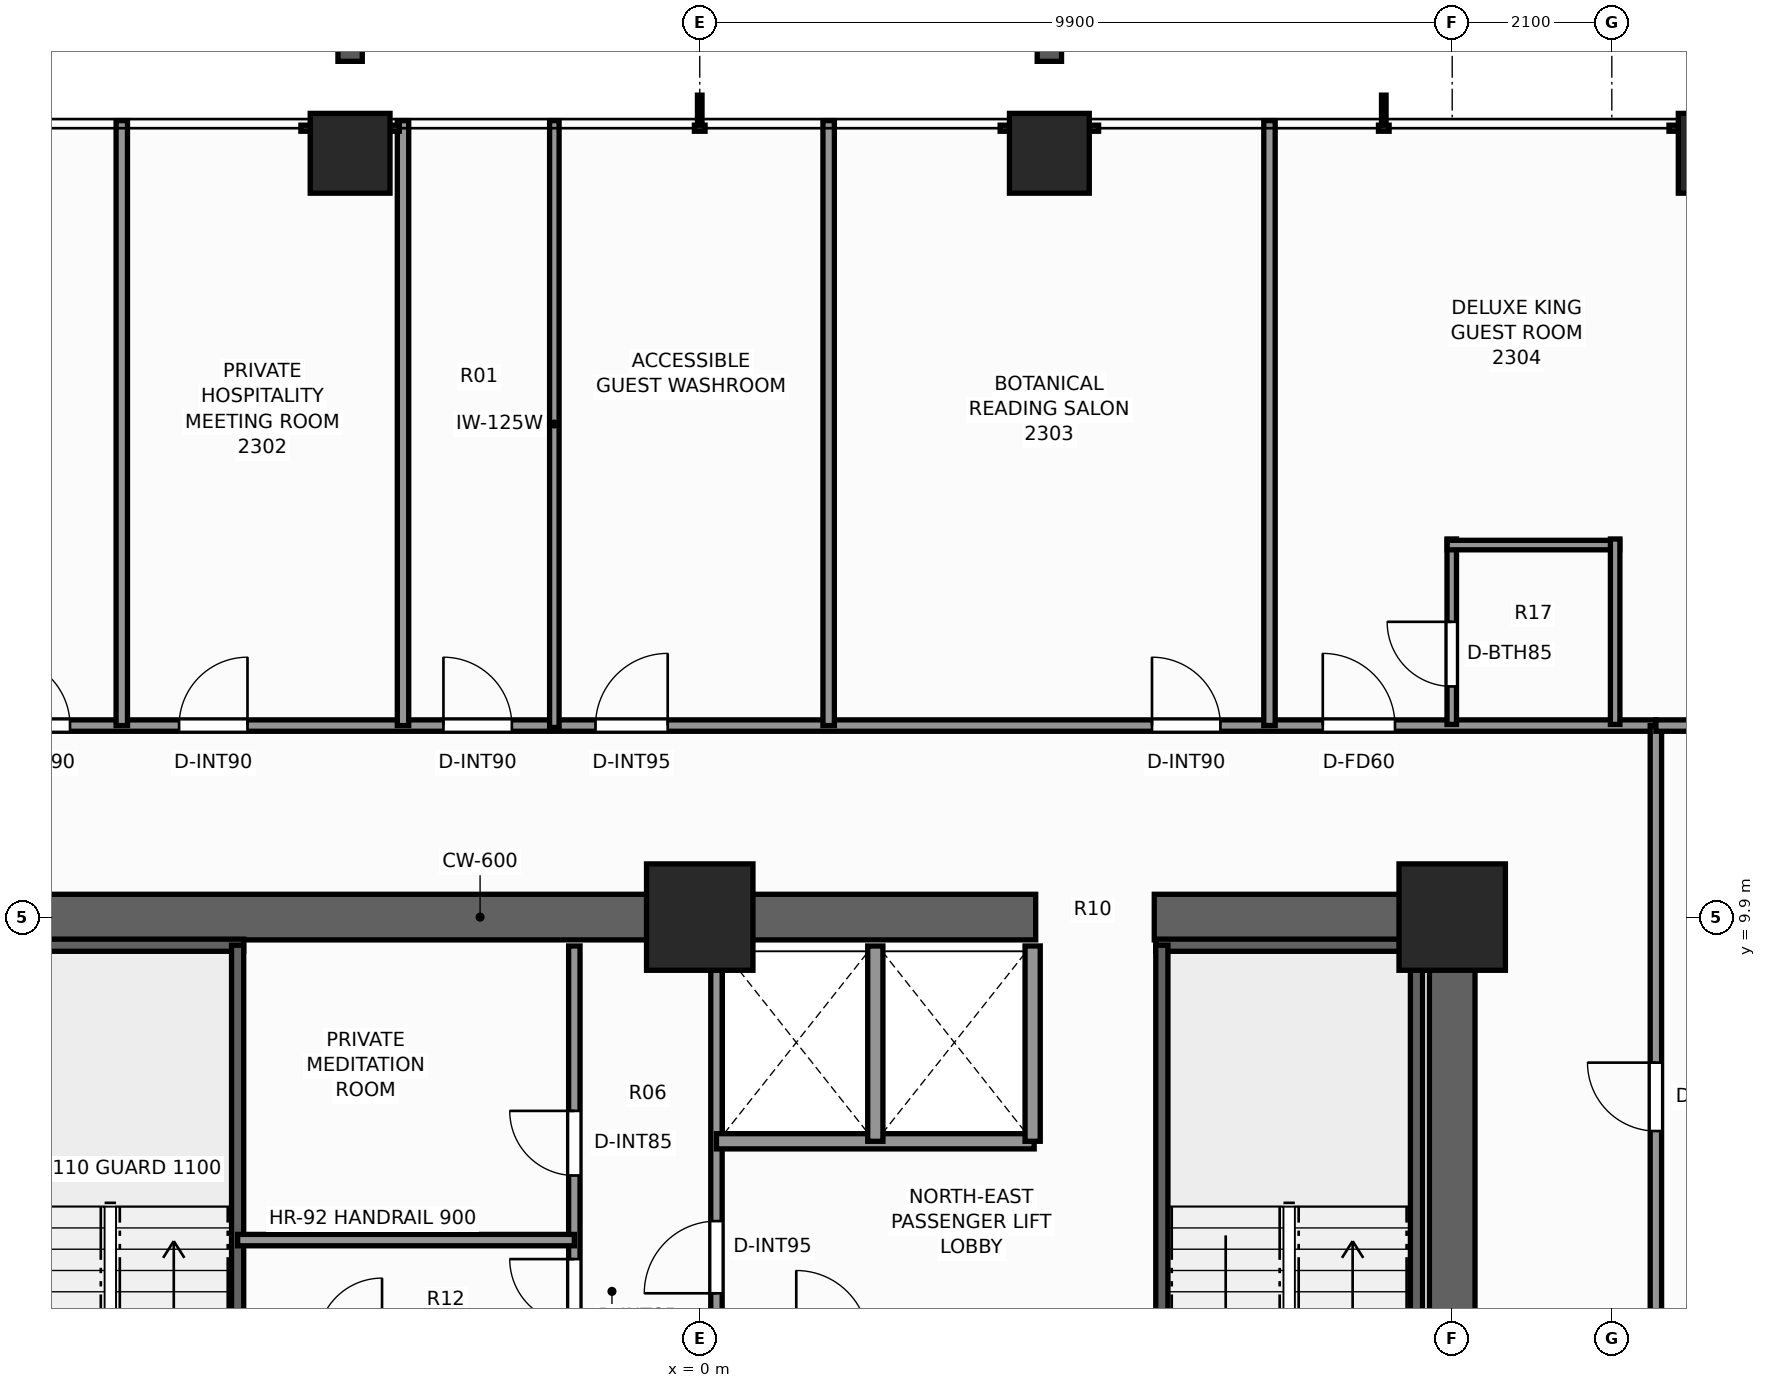
"""IFC4 building model, lengths in metres.
Left out: names, types, materials, properties, quantities, classifications, styles, units other than length and angle.
Written with IfcOpenShell. Run it as: python <this file> out.ifc"""

import sys

from ifc_helpers import new_model, si_unit, direction, frame, frame_2d, origin, origin_2d, place, context, subcontext, project, spatial, rectangle, extrude, element, fill, save


model = new_model("IFC4")
c1 = context("Model", 3, precision=1e-05, world=origin(), true_north=direction((0.0, 1.0)))
c2 = subcontext(c1, "Body", "Model", "MODEL_VIEW")
j1 = project(units=[si_unit("LENGTHUNIT", "METRE"), si_unit("PLANEANGLEUNIT", "RADIAN")], contexts=[c1])
p1 = place(None, origin())
s1 = spatial("IfcSite", under=j1, at=p1, CompositionType="ELEMENT")
p2 = place(p1, origin())
s2 = spatial("IfcBuilding", under=s1, at=p2, CompositionType="ELEMENT")
p3 = place(p2, frame((0.0, 0.0, 82.1)))
s3 = spatial("IfcBuildingStorey", under=s2, at=p3, CompositionType="ELEMENT", Elevation=82.1)
p4 = place(p3, frame((-10.2, 9.9, 0.0), z_axis=(0.0, 0.0, 1.0), x_axis=(1.0, 0.0, 0.0)))
e1 = element("IfcWall", 1, at=p4, inside=s3, PredefinedType="SHEAR", context=c2, shape_type="SweptSolid", body=[
    extrude(rectangle(XDim=14.62, YDim=0.6, at=frame_2d((7.31, 0.0))), origin(), (0.0, 0.0, 1.0), 3.3),
])
p5 = place(p3, frame((5.98, 9.9, 0.0), z_axis=(0.0, 0.0, 1.0), x_axis=(1.0, 0.0, 0.0)))
e2 = element("IfcWall", 2, at=p5, inside=s3, PredefinedType="SHEAR", context=c2, shape_type="SweptSolid", body=[
    extrude(rectangle(XDim=4.22, YDim=0.6, at=frame_2d((2.11, 0.0))), origin(), (0.0, 0.0, 1.0), 3.3),
])
p6 = place(p3, frame((9.9, -3.7, 0.0), z_axis=(0.0, 0.0, 1.0), x_axis=(0.0, 1.0, 0.0)))
e3 = element("IfcWall", 3, at=p6, inside=s3, PredefinedType="SHEAR", context=c2, shape_type="SweptSolid", body=[
    extrude(rectangle(XDim=13.3, YDim=0.6, at=frame_2d((6.65, 0.0))), origin(), (0.0, 0.0, 1.0), 3.3),
])
p7 = place(p6, frame((0.35, 0.0, 0.0)))
e4 = element("IfcOpeningElement", 4, at=p7, cuts=e3, PredefinedType="OPENING", context=c2, shape_type="SweptSolid", body=[
    extrude(rectangle(XDim=1.1, YDim=2.2, at=frame_2d((0.55, 1.1))), frame((0.0, 0.31, 0.0), z_axis=(0.0, -1.0, 0.0), x_axis=(1.0, 0.0, 0.0)), (0.0, 0.0, 1.0), 0.62),
])
for number, where, z_axis, x_axis in (
    (5, (9.9, 9.9, 0.0), (0.0, 0.0, 1.0), (1.0, 0.0, 0.0)),
    (6, (0.0, 9.9, 0.0), (0.0, 0.0, 1.0), (1.0, 0.0, 0.0)),
):
    element("IfcColumn", number, at=place(p3, frame(where, z_axis=z_axis, x_axis=x_axis)), inside=s3, PredefinedType="COLUMN", context=c2, shape_type="SweptSolid", body=[
        extrude(rectangle(XDim=1.4, YDim=1.4, at=origin_2d()), origin(), (0.0, 0.0, 1.0), 3.3),
    ])
for number, where, z_axis, x_axis in (
    (7, (-4.6, 19.95, 0.0), (0.0, 0.0, 1.0), (1.0, 0.0, 0.0)),
    (8, (4.6, 19.95, 0.0), (0.0, 0.0, 1.0), (1.0, 0.0, 0.0)),
    (9, (13.4, 19.95, 0.0), (0.0, 0.0, 1.0), (1.0, 0.0, 0.0)),
):
    element("IfcColumn", number, at=place(p3, frame(where, z_axis=z_axis, x_axis=x_axis)), inside=s3, PredefinedType="COLUMN", context=c2, shape_type="SweptSolid", body=[
        extrude(rectangle(XDim=1.05, YDim=1.05, at=origin_2d()), origin(), (0.0, 0.0, 1.0), 3.3),
    ])
p8 = place(p3, frame((-9.52, 9.53, 0.0), z_axis=(0.0, 0.0, 1.0), x_axis=(1.0, 0.0, 0.0)))
e10 = element("IfcWall", 10, at=p8, inside=s3, PredefinedType="SHEAR", context=c2, shape_type="SweptSolid", body=[
    extrude(rectangle(XDim=3.52, YDim=0.16, at=frame_2d((1.76, 0.0))), origin(), (0.0, 0.0, 1.0), 3.3),
])
p9 = place(p3, frame((-6.08, 1.97, 0.0), z_axis=(0.0, 0.0, 1.0), x_axis=(0.0, 1.0, 0.0)))
e11 = element("IfcWall", 11, at=p9, inside=s3, PredefinedType="SHEAR", context=c2, shape_type="SweptSolid", body=[
    extrude(rectangle(XDim=7.56, YDim=0.16, at=frame_2d((3.78, 0.0))), origin(), (0.0, 0.0, 1.0), 3.3),
])
p10 = place(p3, frame((6.0, 9.53, 0.0), z_axis=(0.0, 0.0, 1.0), x_axis=(1.0, 0.0, 0.0)))
e12 = element("IfcWall", 12, at=p10, inside=s3, PredefinedType="SHEAR", context=c2, shape_type="SweptSolid", body=[
    extrude(rectangle(XDim=3.52, YDim=0.16, at=frame_2d((1.76, 0.0))), origin(), (0.0, 0.0, 1.0), 3.3),
])
for number, where, z_axis, x_axis in (
    (13, (6.08, 1.97, 0.0), (0.0, 0.0, 1.0), (0.0, 1.0, 0.0)),
    (14, (9.43, 1.97, 0.0), (0.0, 0.0, 1.0), (0.0, 1.0, 0.0)),
):
    element("IfcWall", number, at=place(p3, frame(where, z_axis=z_axis, x_axis=x_axis)), inside=s3, PredefinedType="SHEAR", context=c2, shape_type="SweptSolid", body=[
        extrude(rectangle(XDim=7.56, YDim=0.16, at=frame_2d((3.78, 0.0))), origin(), (0.0, 0.0, 1.0), 3.3),
    ])
p11 = place(p3, frame((0.22, 4.3, 0.0), z_axis=(0.0, 0.0, 1.0), x_axis=(0.0, 1.0, 0.0)))
e15 = element("IfcWall", 15, at=p11, inside=s3, PredefinedType="PARTITIONING", context=c2, shape_type="SweptSolid", body=[
    extrude(rectangle(XDim=5.22, YDim=0.15, at=frame_2d((2.61, 0.0))), origin(), (0.0, 0.0, 1.0), 3.08),
])
p12 = place(p11, frame((0.65, 0.0, 0.0)))
e16 = element("IfcOpeningElement", 16, at=p12, cuts=e15, PredefinedType="OPENING", context=c2, shape_type="SweptSolid", body=[
    extrude(rectangle(XDim=0.95, YDim=2.06, at=frame_2d((0.475, 1.03))), frame((0.0, 0.085, 0.0), z_axis=(0.0, -1.0, 0.0), x_axis=(1.0, 0.0, 0.0)), (0.0, 0.0, 1.0), 0.17),
])
p13 = place(p3, frame((-1.65, 4.3, 0.0), z_axis=(0.0, 0.0, 1.0), x_axis=(0.0, 1.0, 0.0)))
e17 = element("IfcWall", 17, at=p13, inside=s3, PredefinedType="PARTITIONING", context=c2, shape_type="SweptSolid", body=[
    extrude(rectangle(XDim=5.22, YDim=0.15, at=frame_2d((2.61, 0.0))), origin(), (0.0, 0.0, 1.0), 3.08),
])
p14 = place(p13, frame((2.2, 0.0, 0.0)))
e18 = element("IfcOpeningElement", 18, at=p14, cuts=e17, PredefinedType="OPENING", context=c2, shape_type="SweptSolid", body=[
    extrude(rectangle(XDim=0.85, YDim=2.03, at=frame_2d((0.425, 1.015))), frame((0.0, 0.085, 0.0), z_axis=(0.0, -1.0, 0.0), x_axis=(1.0, 0.0, 0.0)), (0.0, 0.0, 1.0), 0.17),
])
p15 = place(p13, frame((0.25, 0.0, 0.0)))
e19 = element("IfcOpeningElement", 19, at=p15, cuts=e17, PredefinedType="OPENING", context=c2, shape_type="SweptSolid", body=[
    extrude(rectangle(XDim=0.85, YDim=2.03, at=frame_2d((0.425, 1.015))), frame((0.0, 0.085, 0.0), z_axis=(0.0, -1.0, 0.0), x_axis=(1.0, 0.0, 0.0)), (0.0, 0.0, 1.0), 0.17),
])
p16 = place(p3, frame((-6.08, 5.65, 0.0), z_axis=(0.0, 0.0, 1.0), x_axis=(1.0, 0.0, 0.0)))
e20 = element("IfcWall", 20, at=p16, inside=s3, PredefinedType="PARTITIONING", context=c2, shape_type="SweptSolid", body=[
    extrude(rectangle(XDim=4.43, YDim=0.15, at=frame_2d((2.215, 0.0))), origin(), (0.0, 0.0, 1.0), 3.08),
])
p17 = place(p3, frame((0.22, 6.95, 0.0), z_axis=(0.0, 0.0, 1.0), x_axis=(1.0, 0.0, 0.0)))
e21 = element("IfcWall", 21, at=p17, inside=s3, PredefinedType="SOLIDWALL", context=c2, shape_type="SweptSolid", body=[
    extrude(rectangle(XDim=4.18, YDim=0.2, at=frame_2d((2.09, 0.0))), origin(), (0.0, 0.0, 1.0), 3.08),
])
for number, where, z_axis, x_axis in (
    (22, (4.38, 6.95, 0.0), (0.0, 0.0, 1.0), (0.0, 1.0, 0.0)),
    (23, (2.31, 6.95, 0.0), (0.0, 0.0, 1.0), (0.0, 1.0, 0.0)),
):
    element("IfcWall", number, at=place(p3, frame(where, z_axis=z_axis, x_axis=x_axis)), inside=s3, PredefinedType="SOLIDWALL", context=c2, shape_type="SweptSolid", body=[
        extrude(rectangle(XDim=2.57, YDim=0.2, at=frame_2d((1.285, 0.0))), origin(), (0.0, 0.0, 1.0), 3.08),
    ])
p18 = place(p3, frame((-12.58, 12.42, 0.0), z_axis=(0.0, 0.0, 1.0), x_axis=(1.0, 0.0, 0.0)))
e24 = element("IfcWall", 24, at=p18, inside=s3, PredefinedType="PARTITIONING", context=c2, shape_type="SweptSolid", body=[
    extrude(rectangle(XDim=25.16, YDim=0.15, at=frame_2d((12.58, 0.0))), origin(), (0.0, 0.0, 1.0), 2.292),
])
p19 = place(p18, frame((3.395, 0.0, 0.0)))
e25 = element("IfcOpeningElement", 25, at=p19, cuts=e24, PredefinedType="OPENING", context=c2, shape_type="SweptSolid", body=[
    extrude(rectangle(XDim=0.9, YDim=2.06, at=frame_2d((0.45, 1.03))), frame((0.0, 0.085, 0.0), z_axis=(0.0, -1.0, 0.0), x_axis=(1.0, 0.0, 0.0)), (0.0, 0.0, 1.0), 0.17),
])
p20 = place(p18, frame((5.73, 0.0, 0.0)))
e26 = element("IfcOpeningElement", 26, at=p20, cuts=e24, PredefinedType="OPENING", context=c2, shape_type="SweptSolid", body=[
    extrude(rectangle(XDim=0.9, YDim=2.06, at=frame_2d((0.45, 1.03))), frame((0.0, 0.085, 0.0), z_axis=(0.0, -1.0, 0.0), x_axis=(1.0, 0.0, 0.0)), (0.0, 0.0, 1.0), 0.17),
])
p21 = place(p18, frame((9.208, 0.0, 0.0)))
e27 = element("IfcOpeningElement", 27, at=p21, cuts=e24, PredefinedType="OPENING", context=c2, shape_type="SweptSolid", body=[
    extrude(rectangle(XDim=0.9, YDim=2.06, at=frame_2d((0.45, 1.03))), frame((0.0, 0.085, 0.0), z_axis=(0.0, -1.0, 0.0), x_axis=(1.0, 0.0, 0.0)), (0.0, 0.0, 1.0), 0.17),
])
p22 = place(p18, frame((11.208, 0.0, 0.0)))
e28 = element("IfcOpeningElement", 28, at=p22, cuts=e24, PredefinedType="OPENING", context=c2, shape_type="SweptSolid", body=[
    extrude(rectangle(XDim=0.95, YDim=2.06, at=frame_2d((0.475, 1.03))), frame((0.0, 0.085, 0.0), z_axis=(0.0, -1.0, 0.0), x_axis=(1.0, 0.0, 0.0)), (0.0, 0.0, 1.0), 0.17),
])
p23 = place(p18, frame((18.53, 0.0, 0.0)))
e29 = element("IfcOpeningElement", 29, at=p23, cuts=e24, PredefinedType="OPENING", context=c2, shape_type="SweptSolid", body=[
    extrude(rectangle(XDim=0.9, YDim=2.06, at=frame_2d((0.45, 1.03))), frame((0.0, 0.085, 0.0), z_axis=(0.0, -1.0, 0.0), x_axis=(1.0, 0.0, 0.0)), (0.0, 0.0, 1.0), 0.17),
])
p24 = place(p18, frame((20.777, 0.0, 0.0)))
e30 = element("IfcOpeningElement", 30, at=p24, cuts=e24, PredefinedType="OPENING", context=c2, shape_type="SweptSolid", body=[
    extrude(rectangle(XDim=0.95, YDim=2.06, at=frame_2d((0.475, 1.03))), frame((0.0, 0.085, 0.0), z_axis=(0.0, -1.0, 0.0), x_axis=(1.0, 0.0, 0.0)), (0.0, 0.0, 1.0), 0.17),
])
p25 = place(p3, frame((12.58, -12.42, 0.0), z_axis=(0.0, 0.0, 1.0), x_axis=(0.0, 1.0, 0.0)))
e31 = element("IfcWall", 31, at=p25, inside=s3, PredefinedType="PARTITIONING", context=c2, shape_type="SweptSolid", body=[
    extrude(rectangle(XDim=24.84, YDim=0.15, at=frame_2d((12.42, 0.0))), origin(), (0.0, 0.0, 1.0), 2.292),
])
p26 = place(p25, frame((4.41, 0.0, 0.0)))
e32 = element("IfcOpeningElement", 32, at=p26, cuts=e31, PredefinedType="OPENING", context=c2, shape_type="SweptSolid", body=[
    extrude(rectangle(XDim=0.95, YDim=2.06, at=frame_2d((0.475, 1.03))), frame((0.0, 0.085, 0.0), z_axis=(0.0, -1.0, 0.0), x_axis=(1.0, 0.0, 0.0)), (0.0, 0.0, 1.0), 0.17),
])
p27 = place(p25, frame((19.505, 0.0, 0.0)))
e33 = element("IfcOpeningElement", 33, at=p27, cuts=e31, PredefinedType="OPENING", context=c2, shape_type="SweptSolid", body=[
    extrude(rectangle(XDim=0.9, YDim=2.06, at=frame_2d((0.45, 1.03))), frame((0.0, 0.085, 0.0), z_axis=(0.0, -1.0, 0.0), x_axis=(1.0, 0.0, 0.0)), (0.0, 0.0, 1.0), 0.17),
])
p28 = place(p3, frame((12.58, 12.42, 0.0), z_axis=(0.0, 0.0, 1.0), x_axis=(1.0, 0.0, 0.0)))
e34 = element("IfcWall", 34, at=p28, inside=s3, PredefinedType="PARTITIONING", context=c2, shape_type="SweptSolid", body=[
    extrude(rectangle(XDim=7.8, YDim=0.15, at=frame_2d((3.9, 0.0))), origin(), (0.0, 0.0, 1.0), 2.292),
])
for number, where, z_axis, x_axis in (
    (35, (-7.604, 12.42, 0.0), (0.0, 0.0, 1.0), (0.0, 1.0, 0.0)),
    (36, (-3.904, 12.42, 0.0), (0.0, 0.0, 1.0), (0.0, 1.0, 0.0)),
    (37, (1.696, 12.42, 0.0), (0.0, 0.0, 1.0), (0.0, 1.0, 0.0)),
):
    element("IfcWall", number, at=place(p3, frame(where, z_axis=z_axis, x_axis=x_axis)), inside=s3, PredefinedType="PARTITIONING", context=c2, shape_type="SweptSolid", body=[
        extrude(rectangle(XDim=7.96, YDim=0.15, at=frame_2d((3.98, 0.0))), origin(), (0.0, 0.0, 1.0), 2.449),
    ])
p29 = place(p3, frame((-1.913, 12.395, 0.0), z_axis=(0.0, 0.0, 1.0), x_axis=(0.0, 1.0, 0.0)))
e38 = element("IfcWall", 38, at=p29, inside=s3, PredefinedType="PARTITIONING", context=c2, shape_type="SweptSolid", body=[
    extrude(rectangle(XDim=7.985, YDim=0.125, at=frame_2d((3.992, 0.0))), origin(), (0.0, 0.0, 1.0), 2.449),
])
p30 = place(p3, frame((7.496, 12.42, 0.0), z_axis=(0.0, 0.0, 1.0), x_axis=(0.0, 1.0, 0.0)))
e39 = element("IfcWall", 39, at=p30, inside=s3, PredefinedType="PARTITIONING", context=c2, shape_type="SweptSolid", body=[
    extrude(rectangle(XDim=7.96, YDim=0.15, at=frame_2d((3.98, 0.0))), origin(), (0.0, 0.0, 1.0), 2.449),
])
p31 = place(p3, frame((9.894, 12.435, 0.0), z_axis=(0.0, 0.0, 1.0), x_axis=(0.0, 1.0, 0.0)))
e40 = element("IfcWall", 40, at=p31, inside=s3, PredefinedType="PARTITIONING", context=c2, shape_type="SweptSolid", body=[
    extrude(rectangle(XDim=2.44, YDim=0.125, at=frame_2d((1.22, 0.0))), origin(), (0.0, 0.0, 1.0), 3.08),
])
p32 = place(p31, frame((0.5, 0.0, 0.0)))
e41 = element("IfcOpeningElement", 41, at=p32, cuts=e40, PredefinedType="OPENING", context=c2, shape_type="SweptSolid", body=[
    extrude(rectangle(XDim=0.85, YDim=2.03, at=frame_2d((0.425, 1.015))), frame((0.0, 0.073, 0.0), z_axis=(0.0, -1.0, 0.0), x_axis=(1.0, 0.0, 0.0)), (0.0, 0.0, 1.0), 0.145),
])
p33 = place(p3, frame((9.834, 14.795, 0.0), z_axis=(0.0, 0.0, 1.0), x_axis=(1.0, 0.0, 0.0)))
e42 = element("IfcWall", 42, at=p33, inside=s3, PredefinedType="PARTITIONING", context=c2, shape_type="SweptSolid", body=[
    extrude(rectangle(XDim=2.27, YDim=0.125, at=frame_2d((1.135, 0.0))), origin(), (0.0, 0.0, 1.0), 2.292),
])
p34 = place(p3, frame((12.044, 12.435, 0.0), z_axis=(0.0, 0.0, 1.0), x_axis=(0.0, 1.0, 0.0)))
e43 = element("IfcWall", 43, at=p34, inside=s3, PredefinedType="PARTITIONING", context=c2, shape_type="SweptSolid", body=[
    extrude(rectangle(XDim=2.44, YDim=0.125, at=frame_2d((1.22, 0.0))), origin(), (0.0, 0.0, 1.0), 3.08),
])
p35 = place(p12, origin())
e44 = element("IfcDoor", 44, at=p35, inside=s3, OperationType="SINGLE_SWING_LEFT", PredefinedType="DOOR", context=c2, shape_type="SweptSolid", body=[
    extrude(rectangle(XDim=0.95, YDim=2.06, at=frame_2d((0.475, 1.03))), frame((0.0, 0.025, 0.0), z_axis=(0.0, -1.0, 0.0), x_axis=(1.0, 0.0, 0.0)), (0.0, 0.0, 1.0), 0.05),
])
fill(e16, e44)
p36 = place(p14, origin())
e45 = element("IfcDoor", 45, at=p36, inside=s3, OperationType="SINGLE_SWING_RIGHT", PredefinedType="DOOR", context=c2, shape_type="SweptSolid", body=[
    extrude(rectangle(XDim=0.85, YDim=2.03, at=frame_2d((0.425, 1.015))), frame((0.0, 0.025, 0.0), z_axis=(0.0, -1.0, 0.0), x_axis=(1.0, 0.0, 0.0)), (0.0, 0.0, 1.0), 0.05),
])
fill(e18, e45)
p37 = place(p15, origin())
e46 = element("IfcDoor", 46, at=p37, inside=s3, OperationType="SINGLE_SWING_RIGHT", PredefinedType="DOOR", context=c2, shape_type="SweptSolid", body=[
    extrude(rectangle(XDim=0.85, YDim=2.03, at=frame_2d((0.425, 1.015))), frame((0.0, 0.025, 0.0), z_axis=(0.0, -1.0, 0.0), x_axis=(1.0, 0.0, 0.0)), (0.0, 0.0, 1.0), 0.05),
])
fill(e19, e46)
p38 = place(p19, origin())
e47 = element("IfcDoor", 47, at=p38, inside=s3, OperationType="SINGLE_SWING_LEFT", PredefinedType="DOOR", context=c2, shape_type="SweptSolid", body=[
    extrude(rectangle(XDim=0.9, YDim=2.06, at=frame_2d((0.45, 1.03))), frame((0.0, 0.025, 0.0), z_axis=(0.0, -1.0, 0.0), x_axis=(1.0, 0.0, 0.0)), (0.0, 0.0, 1.0), 0.05),
])
fill(e25, e47)
p39 = place(p20, origin())
e48 = element("IfcDoor", 48, at=p39, inside=s3, OperationType="SINGLE_SWING_RIGHT", PredefinedType="DOOR", context=c2, shape_type="SweptSolid", body=[
    extrude(rectangle(XDim=0.9, YDim=2.06, at=frame_2d((0.45, 1.03))), frame((0.0, 0.025, 0.0), z_axis=(0.0, -1.0, 0.0), x_axis=(1.0, 0.0, 0.0)), (0.0, 0.0, 1.0), 0.05),
])
fill(e26, e48)
p40 = place(p21, origin())
e49 = element("IfcDoor", 49, at=p40, inside=s3, OperationType="SINGLE_SWING_LEFT", PredefinedType="DOOR", context=c2, shape_type="SweptSolid", body=[
    extrude(rectangle(XDim=0.9, YDim=2.06, at=frame_2d((0.45, 1.03))), frame((0.0, 0.025, 0.0), z_axis=(0.0, -1.0, 0.0), x_axis=(1.0, 0.0, 0.0)), (0.0, 0.0, 1.0), 0.05),
])
fill(e27, e49)
p41 = place(p22, origin())
e50 = element("IfcDoor", 50, at=p41, inside=s3, OperationType="SINGLE_SWING_RIGHT", PredefinedType="DOOR", context=c2, shape_type="SweptSolid", body=[
    extrude(rectangle(XDim=0.95, YDim=2.06, at=frame_2d((0.475, 1.03))), frame((0.0, 0.025, 0.0), z_axis=(0.0, -1.0, 0.0), x_axis=(1.0, 0.0, 0.0)), (0.0, 0.0, 1.0), 0.05),
])
fill(e28, e50)
p42 = place(p23, origin())
e51 = element("IfcDoor", 51, at=p42, inside=s3, OperationType="SINGLE_SWING_LEFT", PredefinedType="DOOR", context=c2, shape_type="SweptSolid", body=[
    extrude(rectangle(XDim=0.9, YDim=2.06, at=frame_2d((0.45, 1.03))), frame((0.0, 0.025, 0.0), z_axis=(0.0, -1.0, 0.0), x_axis=(1.0, 0.0, 0.0)), (0.0, 0.0, 1.0), 0.05),
])
fill(e29, e51)
p43 = place(p32, origin())
e52 = element("IfcDoor", 52, at=p43, inside=s3, OperationType="SINGLE_SWING_RIGHT", PredefinedType="DOOR", context=c2, shape_type="SweptSolid", body=[
    extrude(rectangle(XDim=0.85, YDim=2.03, at=frame_2d((0.425, 1.015))), frame((0.0, 0.025, 0.0), z_axis=(0.0, -1.0, 0.0), x_axis=(1.0, 0.0, 0.0)), (0.0, 0.0, 1.0), 0.05),
])
fill(e41, e52)
p44 = place(p24, origin())
e53 = element("IfcDoor", 53, at=p44, inside=s3, OperationType="SINGLE_SWING_LEFT", PredefinedType="DOOR", context=c2, shape_type="SweptSolid", body=[
    extrude(rectangle(XDim=0.95, YDim=2.06, at=frame_2d((0.475, 1.03))), frame((0.0, 0.025, 0.0), z_axis=(0.0, -1.0, 0.0), x_axis=(1.0, 0.0, 0.0)), (0.0, 0.0, 1.0), 0.05),
])
fill(e30, e53)
p45 = place(p27, origin())
e54 = element("IfcDoor", 54, at=p45, inside=s3, OperationType="SINGLE_SWING_RIGHT", PredefinedType="DOOR", context=c2, shape_type="SweptSolid", body=[
    extrude(rectangle(XDim=0.9, YDim=2.06, at=frame_2d((0.45, 1.03))), frame((0.0, 0.025, 0.0), z_axis=(0.0, -1.0, 0.0), x_axis=(1.0, 0.0, 0.0)), (0.0, 0.0, 1.0), 0.05),
])
fill(e33, e54)
save(model, sys.argv[1])
